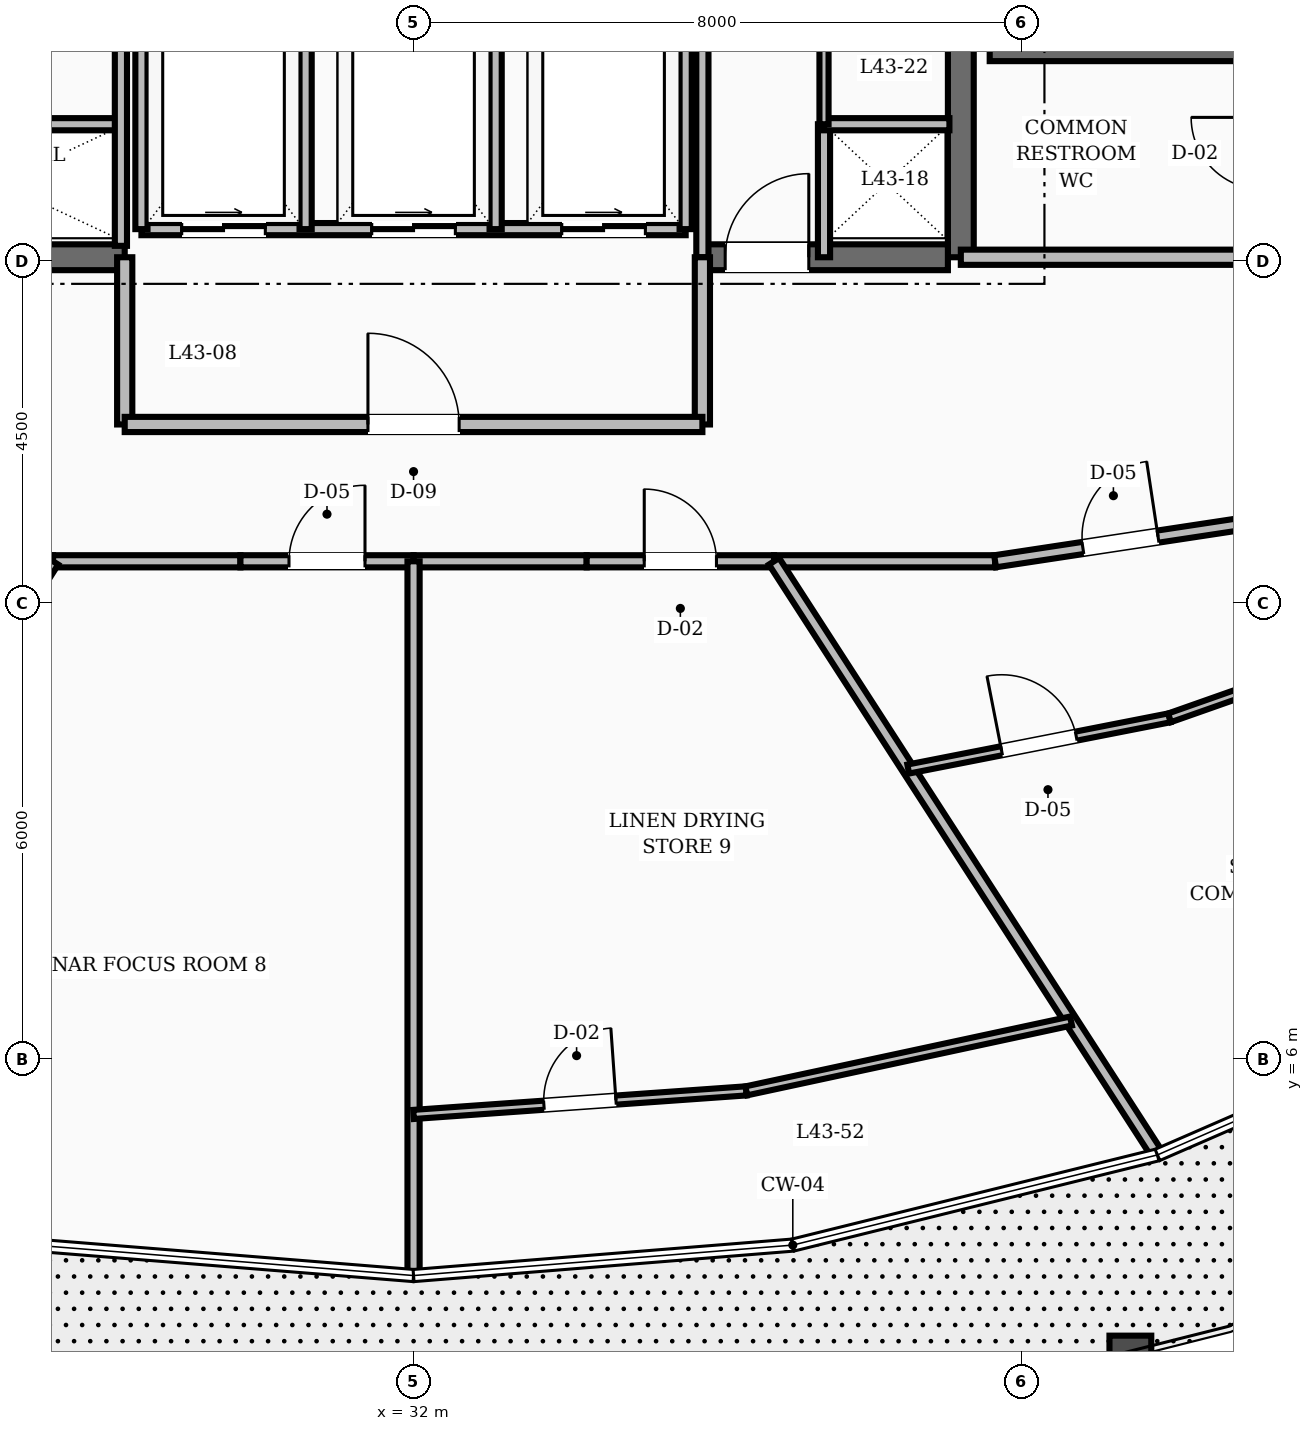
"""IFC4 building model, lengths in metres.
Left out: names, types, materials, properties, quantities, classifications, styles, units other than length and angle.
Written with IfcOpenShell. Run it as: python <this file> out.ifc"""

import sys

from ifc_helpers import new_model, si_unit, direction, frame, frame_2d, origin, place, context, subcontext, project, spatial, rectangle, extrude, element, fill, save


model = new_model("IFC4")
c1 = context("Model", 3, precision=1e-05, world=origin(), true_north=direction((0.0, 1.0)))
c2 = subcontext(c1, "Body", "Model", "MODEL_VIEW")
j1 = project(units=[si_unit("LENGTHUNIT", "METRE"), si_unit("PLANEANGLEUNIT", "RADIAN")], contexts=[c1])
p1 = place(None, origin())
s1 = spatial("IfcSite", under=j1, at=p1, CompositionType="ELEMENT")
p2 = place(p1, origin())
s2 = spatial("IfcBuilding", under=s1, at=p2, CompositionType="ELEMENT")
p3 = place(p2, frame((0.0, 0.0, 167.6)))
s3 = spatial("IfcBuildingStorey", under=s2, at=p3, CompositionType="ELEMENT", Elevation=167.6)
p4 = place(p3, frame((39.2, 16.55, 0.0), z_axis=(0.0, 0.0, 1.0), x_axis=(0.0, 1.0, 0.0)))
e1 = element("IfcWall", 1, at=p4, inside=s3, PredefinedType="SHEAR", context=c2, shape_type="SweptSolid", body=[
    extrude(rectangle(XDim=6.3, YDim=0.34, at=frame_2d((3.15, 0.0))), origin(), (0.0, 0.0, 1.0), 3.6),
])
p5 = place(p3, frame((24.97, 16.55, 0.0), z_axis=(0.0, 0.0, 1.0), x_axis=(1.0, 0.0, 0.0)))
e2 = element("IfcWall", 2, at=p5, inside=s3, PredefinedType="SHEAR", context=c2, shape_type="SweptSolid", body=[
    extrude(rectangle(XDim=3.23, YDim=0.34, at=frame_2d((1.615, 0.0))), origin(), (0.0, 0.0, 1.0), 3.6),
])
p6 = place(p3, frame((35.8, 16.55, 0.0), z_axis=(0.0, 0.0, 1.0), x_axis=(1.0, 0.0, 0.0)))
e3 = element("IfcWall", 3, at=p6, inside=s3, PredefinedType="SHEAR", context=c2, shape_type="SweptSolid", body=[
    extrude(rectangle(XDim=3.23, YDim=0.34, at=frame_2d((1.615, 0.0))), origin(), (0.0, 0.0, 1.0), 3.6),
])
p7 = place(p6, frame((0.3, 0.0, 0.0)))
e4 = element("IfcOpeningElement", 4, at=p7, cuts=e3, PredefinedType="OPENING", context=c2, shape_type="SweptSolid", body=[
    extrude(rectangle(XDim=1.1, YDim=2.1, at=frame_2d((0.55, 1.05))), frame((0.0, 0.18, 0.0), z_axis=(0.0, -1.0, 0.0), x_axis=(1.0, 0.0, 0.0)), (0.0, 0.0, 1.0), 0.36),
])
p8 = place(p3, frame((39.58, 19.28, 0.0), z_axis=(0.0, 0.0, 1.0), x_axis=(1.0, 0.0, 0.0)))
e5 = element("IfcWall", 5, at=p8, inside=s3, PredefinedType="SHEAR", context=c2, shape_type="SweptSolid", body=[
    extrude(rectangle(XDim=3.6, YDim=0.3, at=frame_2d((1.8, 0.0))), origin(), (0.0, 0.0, 1.0), 3.6),
])
p9 = place(p3, frame((39.2, 16.55, 0.0), z_axis=(0.0, 0.0, 1.0), x_axis=(1.0, 0.0, 0.0)))
e6 = element("IfcWall", 6, at=p9, inside=s3, PredefinedType="SOLIDWALL", context=c2, shape_type="SweptSolid", body=[
    extrude(rectangle(XDim=3.98, YDim=0.2, at=frame_2d((1.99, 0.0))), origin(), (0.0, 0.0, 1.0), 2.8),
])
p10 = place(p3, frame((35.8, 16.55, 0.0), z_axis=(0.0, 0.0, 1.0), x_axis=(0.0, 1.0, 0.0)))
e7 = element("IfcWall", 7, at=p10, inside=s3, PredefinedType="SOLIDWALL", context=c2, shape_type="SweptSolid", body=[
    extrude(rectangle(XDim=3.3, YDim=0.16, at=frame_2d((1.65, 0.0))), origin(), (0.0, 0.0, 1.0), 2.8),
])
p11 = place(p3, frame((37.4, 16.55, 0.0), z_axis=(0.0, 0.0, 1.0), x_axis=(0.0, 1.0, 0.0)))
e8 = element("IfcWall", 8, at=p11, inside=s3, PredefinedType="SOLIDWALL", context=c2, shape_type="SweptSolid", body=[
    extrude(rectangle(XDim=1.75, YDim=0.16, at=frame_2d((0.875, 0.0))), origin(), (0.0, 0.0, 1.0), 2.8),
])
for number, where, z_axis, x_axis in (
    (9, (28.2, 14.35, 0.0), (0.0, 0.0, 1.0), (0.0, 1.0, 0.0)),
    (10, (35.8, 14.35, 0.0), (0.0, 0.0, 1.0), (0.0, 1.0, 0.0)),
):
    element("IfcWall", number, at=place(p3, frame(where, z_axis=z_axis, x_axis=x_axis)), inside=s3, PredefinedType="SOLIDWALL", context=c2, shape_type="SweptSolid", body=[
        extrude(rectangle(XDim=2.2, YDim=0.2, at=frame_2d((1.1, 0.0))), origin(), (0.0, 0.0, 1.0), 2.8),
    ])
p12 = place(p3, frame((28.2, 14.35, 0.0), z_axis=(0.0, 0.0, 1.0), x_axis=(1.0, 0.0, 0.0)))
e11 = element("IfcWall", 11, at=p12, inside=s3, PredefinedType="SOLIDWALL", context=c2, shape_type="SweptSolid", body=[
    extrude(rectangle(XDim=7.6, YDim=0.2, at=frame_2d((3.8, 0.0))), origin(), (0.0, 0.0, 1.0), 2.8),
])
p13 = place(p12, frame((3.2, 0.0, 0.0)))
e12 = element("IfcOpeningElement", 12, at=p13, cuts=e11, PredefinedType="OPENING", context=c2, shape_type="SweptSolid", body=[
    extrude(rectangle(XDim=1.2, YDim=2.1, at=frame_2d((0.6, 1.05))), frame((0.0, 0.11, 0.0), z_axis=(0.0, -1.0, 0.0), x_axis=(1.0, 0.0, 0.0)), (0.0, 0.0, 1.0), 0.22),
])
p14 = place(p3, frame((28.42, 16.92, 0.0), z_axis=(0.0, 0.0, 1.0), x_axis=(1.0, 0.0, 0.0)))
e13 = element("IfcWall", 13, at=p14, inside=s3, PredefinedType="SOLIDWALL", context=c2, shape_type="SweptSolid", body=[
    extrude(rectangle(XDim=7.16, YDim=0.16, at=frame_2d((3.58, 0.0))), origin(), (0.0, 0.0, 1.0), 2.8),
])
p15 = place(p14, frame((0.53, 0.0, 0.0)))
e14 = element("IfcOpeningElement", 14, at=p15, cuts=e13, PredefinedType="OPENING", context=c2, shape_type="SweptSolid", body=[
    extrude(rectangle(XDim=1.1, YDim=2.15, at=frame_2d((0.55, 1.075))), frame((0.0, 0.09, 0.0), z_axis=(0.0, -1.0, 0.0), x_axis=(1.0, 0.0, 0.0)), (0.0, 0.0, 1.0), 0.18),
])
p16 = place(p14, frame((3.03, 0.0, 0.0)))
e15 = element("IfcOpeningElement", 15, at=p16, cuts=e13, PredefinedType="OPENING", context=c2, shape_type="SweptSolid", body=[
    extrude(rectangle(XDim=1.1, YDim=2.15, at=frame_2d((0.55, 1.075))), frame((0.0, 0.09, 0.0), z_axis=(0.0, -1.0, 0.0), x_axis=(1.0, 0.0, 0.0)), (0.0, 0.0, 1.0), 0.18),
])
p17 = place(p14, frame((5.53, 0.0, 0.0)))
e16 = element("IfcOpeningElement", 16, at=p17, cuts=e13, PredefinedType="OPENING", context=c2, shape_type="SweptSolid", body=[
    extrude(rectangle(XDim=1.1, YDim=2.15, at=frame_2d((0.55, 1.075))), frame((0.0, 0.09, 0.0), z_axis=(0.0, -1.0, 0.0), x_axis=(1.0, 0.0, 0.0)), (0.0, 0.0, 1.0), 0.18),
])
for number, where, z_axis, x_axis in (
    (17, (28.42, 16.92, 0.0), (0.0, 0.0, 1.0), (0.0, 1.0, 0.0)),
    (18, (30.58, 16.92, 0.0), (0.0, 0.0, 1.0), (0.0, 1.0, 0.0)),
    (19, (33.08, 16.92, 0.0), (0.0, 0.0, 1.0), (0.0, 1.0, 0.0)),
    (20, (35.58, 16.92, 0.0), (0.0, 0.0, 1.0), (0.0, 1.0, 0.0)),
):
    element("IfcWall", number, at=place(p3, frame(where, z_axis=z_axis, x_axis=x_axis)), inside=s3, PredefinedType="SOLIDWALL", context=c2, shape_type="SweptSolid", body=[
        extrude(rectangle(XDim=2.76, YDim=0.16, at=frame_2d((1.38, 0.0))), origin(), (0.0, 0.0, 1.0), 2.8),
    ])
p18 = place(p3, frame((24.95, 18.3, 0.0), z_axis=(0.0, 0.0, 1.0), x_axis=(1.0, 0.0, 0.0)))
e21 = element("IfcWall", 21, at=p18, inside=s3, PredefinedType="SOLIDWALL", context=c2, shape_type="SweptSolid", body=[
    extrude(rectangle(XDim=3.2, YDim=0.16, at=frame_2d((1.6, 0.0))), origin(), (0.0, 0.0, 1.0), 2.8),
])
p19 = place(p3, frame((28.15, 16.7, 0.0), z_axis=(0.0, 0.0, 1.0), x_axis=(0.0, 1.0, 0.0)))
e22 = element("IfcWall", 22, at=p19, inside=s3, PredefinedType="SOLIDWALL", context=c2, shape_type="SweptSolid", body=[
    extrude(rectangle(XDim=6.05, YDim=0.16, at=frame_2d((3.025, 0.0))), origin(), (0.0, 0.0, 1.0), 2.8),
])
p20 = place(p3, frame((37.4, 18.3, 0.0), z_axis=(0.0, 0.0, 1.0), x_axis=(1.0, 0.0, 0.0)))
e23 = element("IfcWall", 23, at=p20, inside=s3, PredefinedType="SOLIDWALL", context=c2, shape_type="SweptSolid", body=[
    extrude(rectangle(XDim=1.65, YDim=0.16, at=frame_2d((0.825, 0.0))), origin(), (0.0, 0.0, 1.0), 2.8),
])
p21 = place(p3, frame((37.4, 18.3, 0.0), z_axis=(0.0, 0.0, 1.0), x_axis=(0.0, 1.0, 0.0)))
e24 = element("IfcWall", 24, at=p21, inside=s3, PredefinedType="PARTITIONING", context=c2, shape_type="SweptSolid", body=[
    extrude(rectangle(XDim=4.45, YDim=0.12, at=frame_2d((2.225, 0.0))), origin(), (0.0, 0.0, 1.0), 2.8),
])
p22 = place(p21, frame((1.75, 0.0, 0.0)))
e25 = element("IfcOpeningElement", 25, at=p22, cuts=e24, PredefinedType="OPENING", context=c2, shape_type="SweptSolid", body=[
    extrude(rectangle(XDim=0.95, YDim=2.1, at=frame_2d((0.475, 1.05))), frame((0.0, 0.07, 0.0), z_axis=(0.0, -1.0, 0.0), x_axis=(1.0, 0.0, 0.0)), (0.0, 0.0, 1.0), 0.14),
])
p23 = place(p3, frame((24.349, 12.55, 0.0), z_axis=(0.0, 0.0, 1.0), x_axis=(1.0, 0.0, 0.0)))
e26 = element("IfcWall", 26, at=p23, inside=s3, PredefinedType="SOLIDWALL", context=c2, shape_type="SweptSolid", body=[
    extrude(rectangle(XDim=2.908, YDim=0.16, at=frame_2d((1.454, 0.0))), origin(), (0.0, 0.0, 1.0), 2.8),
])
p24 = place(p3, frame((27.257, 12.55, 0.0), z_axis=(0.0, 0.0, 1.0), x_axis=(1.0, 0.0, 0.0)))
e27 = element("IfcWall", 27, at=p24, inside=s3, PredefinedType="SOLIDWALL", context=c2, shape_type="SweptSolid", body=[
    extrude(rectangle(XDim=2.465, YDim=0.16, at=frame_2d((1.232, 0.0))), origin(), (0.0, 0.0, 1.0), 2.8),
])
p25 = place(p3, frame((29.722, 12.55, 0.0), z_axis=(0.0, 0.0, 1.0), x_axis=(1.0, 0.0, 0.0)))
e28 = element("IfcWall", 28, at=p25, inside=s3, PredefinedType="SOLIDWALL", context=c2, shape_type="SweptSolid", body=[
    extrude(rectangle(XDim=2.278, YDim=0.16, at=frame_2d((1.139, 0.0))), origin(), (0.0, 0.0, 1.0), 2.8),
])
p26 = place(p25, frame((0.639, 0.0, 0.0)))
e29 = element("IfcOpeningElement", 29, at=p26, cuts=e28, PredefinedType="OPENING", context=c2, shape_type="SweptSolid", body=[
    extrude(rectangle(XDim=1.0, YDim=2.1, at=frame_2d((0.5, 1.05))), frame((0.0, 0.09, 0.0), z_axis=(0.0, -1.0, 0.0), x_axis=(1.0, 0.0, 0.0)), (0.0, 0.0, 1.0), 0.18),
])
p27 = place(p3, frame((32.0, 12.55, 0.0), z_axis=(0.0, 0.0, 1.0), x_axis=(1.0, 0.0, 0.0)))
e30 = element("IfcWall", 30, at=p27, inside=s3, PredefinedType="SOLIDWALL", context=c2, shape_type="SweptSolid", body=[
    extrude(rectangle(XDim=2.278, YDim=0.16, at=frame_2d((1.139, 0.0))), origin(), (0.0, 0.0, 1.0), 2.8),
])
p28 = place(p3, frame((34.278, 12.55, 0.0), z_axis=(0.0, 0.0, 1.0), x_axis=(1.0, 0.0, 0.0)))
e31 = element("IfcWall", 31, at=p28, inside=s3, PredefinedType="SOLIDWALL", context=c2, shape_type="SweptSolid", body=[
    extrude(rectangle(XDim=2.465, YDim=0.16, at=frame_2d((1.232, 0.0))), origin(), (0.0, 0.0, 1.0), 2.8),
])
p29 = place(p28, frame((0.758, 0.0, 0.0)))
e32 = element("IfcOpeningElement", 32, at=p29, cuts=e31, PredefinedType="OPENING", context=c2, shape_type="SweptSolid", body=[
    extrude(rectangle(XDim=0.95, YDim=2.1, at=frame_2d((0.475, 1.05))), frame((0.0, 0.09, 0.0), z_axis=(0.0, -1.0, 0.0), x_axis=(1.0, 0.0, 0.0)), (0.0, 0.0, 1.0), 0.18),
])
p30 = place(p3, frame((36.743, 12.55, 0.0), z_axis=(0.0, 0.0, 1.0), x_axis=(1.0, 0.0, 0.0)))
e33 = element("IfcWall", 33, at=p30, inside=s3, PredefinedType="SOLIDWALL", context=c2, shape_type="SweptSolid", body=[
    extrude(rectangle(XDim=2.908, YDim=0.16, at=frame_2d((1.454, 0.0))), origin(), (0.0, 0.0, 1.0), 2.8),
])
p31 = place(p3, frame((39.651, 12.55, 0.0), z_axis=(0.0, 0.0, 1.0), x_axis=(0.988710906508, 0.149835721217, 0.0)))
e34 = element("IfcWall", 34, at=p31, inside=s3, PredefinedType="SOLIDWALL", context=c2, shape_type="SweptSolid", body=[
    extrude(rectangle(XDim=3.337, YDim=0.16, at=frame_2d((1.668, 0.0))), origin(), (0.0, 0.0, 1.0), 2.8),
])
p32 = place(p31, frame((1.168, 0.0, 0.0)))
e35 = element("IfcOpeningElement", 35, at=p32, cuts=e34, PredefinedType="OPENING", context=c2, shape_type="SweptSolid", body=[
    extrude(rectangle(XDim=1.0, YDim=2.1, at=frame_2d((0.5, 1.05))), frame((0.0, 0.09, 0.0), z_axis=(0.0, -1.0, 0.0), x_axis=(1.0, 0.0, 0.0)), (0.0, 0.0, 1.0), 0.18),
])
p33 = place(p3, frame((36.743, 12.55, 0.0), z_axis=(0.0, 0.0, 1.0), x_axis=(0.542572394961, -0.840009045324, 0.0)))
e36 = element("IfcWall", 36, at=p33, inside=s3, PredefinedType="SOLIDWALL", context=c2, shape_type="SweptSolid", body=[
    extrude(rectangle(XDim=9.247, YDim=0.16, at=frame_2d((4.624, 0.0))), origin(), (0.0, 0.0, 1.0), 2.8),
])
p34 = place(p3, frame((38.508, 9.817, 0.0), z_axis=(0.0, 0.0, 1.0), x_axis=(0.981313491658, 0.192415776612, 0.0)))
e37 = element("IfcWall", 37, at=p34, inside=s3, PredefinedType="PARTITIONING", context=c2, shape_type="SweptSolid", body=[
    extrude(rectangle(XDim=3.503, YDim=0.12, at=frame_2d((1.751, 0.0))), origin(), (0.0, 0.0, 1.0), 2.8),
])
p35 = place(p34, frame((1.252, 0.0, 0.0)))
e38 = element("IfcOpeningElement", 38, at=p35, cuts=e37, PredefinedType="OPENING", context=c2, shape_type="SweptSolid", body=[
    extrude(rectangle(XDim=1.0, YDim=2.1, at=frame_2d((0.5, 1.05))), frame((0.0, 0.07, 0.0), z_axis=(0.0, -1.0, 0.0), x_axis=(1.0, 0.0, 0.0)), (0.0, 0.0, 1.0), 0.14),
])
p36 = place(p3, frame((41.946, 10.491, 0.0), z_axis=(0.0, 0.0, 1.0), x_axis=(0.943262037543, 0.332049286298, 0.0)))
e39 = element("IfcWall", 39, at=p36, inside=s3, PredefinedType="PARTITIONING", context=c2, shape_type="SweptSolid", body=[
    extrude(rectangle(XDim=3.712, YDim=0.12, at=frame_2d((1.856, 0.0))), origin(), (0.0, 0.0, 1.0), 2.8),
])
p37 = place(p3, frame((27.257, 12.55, 0.0), z_axis=(0.0, 0.0, 1.0), x_axis=(-0.53396393122, -0.845507256122, 0.0)))
e40 = element("IfcWall", 40, at=p37, inside=s3, PredefinedType="SOLIDWALL", context=c2, shape_type="SweptSolid", body=[
    extrude(rectangle(XDim=9.799, YDim=0.16, at=frame_2d((4.899, 0.0))), origin(), (0.0, 0.0, 1.0), 2.8),
])
p38 = place(p3, frame((32.0, 12.55, 0.0), z_axis=(0.0, 0.0, 1.0), x_axis=(0.0, -1.0, 0.0)))
e41 = element("IfcWall", 41, at=p38, inside=s3, PredefinedType="SOLIDWALL", context=c2, shape_type="SweptSolid", body=[
    extrude(rectangle(XDim=9.347, YDim=0.16, at=frame_2d((4.673, 0.0))), origin(), (0.0, 0.0, 1.0), 2.8),
])
p39 = place(p3, frame((32.0, 5.273, 0.0), z_axis=(0.0, 0.0, 1.0), x_axis=(0.997497239471, 0.070705425875, 0.0)))
e42 = element("IfcWall", 42, at=p39, inside=s3, PredefinedType="PARTITIONING", context=c2, shape_type="SweptSolid", body=[
    extrude(rectangle(XDim=4.389, YDim=0.12, at=frame_2d((2.194, 0.0))), origin(), (0.0, 0.0, 1.0), 2.8),
])
p40 = place(p39, frame((1.719, 0.0, 0.0)))
e43 = element("IfcOpeningElement", 43, at=p40, cuts=e42, PredefinedType="OPENING", context=c2, shape_type="SweptSolid", body=[
    extrude(rectangle(XDim=0.95, YDim=2.1, at=frame_2d((0.475, 1.05))), frame((0.0, 0.07, 0.0), z_axis=(0.0, -1.0, 0.0), x_axis=(1.0, 0.0, 0.0)), (0.0, 0.0, 1.0), 0.14),
])
p41 = place(p3, frame((36.378, 5.583, 0.0), z_axis=(0.0, 0.0, 1.0), x_axis=(0.977645964839, 0.210257859387, 0.0)))
e44 = element("IfcWall", 44, at=p41, inside=s3, PredefinedType="PARTITIONING", context=c2, shape_type="SweptSolid", body=[
    extrude(rectangle(XDim=4.369, YDim=0.12, at=frame_2d((2.185, 0.0))), origin(), (0.0, 0.0, 1.0), 2.8),
])
p42 = place(p7, origin())
e45 = element("IfcDoor", 45, at=p42, inside=s3, OperationType="SINGLE_SWING_RIGHT", PredefinedType="DOOR", context=c2, shape_type="SweptSolid", body=[
    extrude(rectangle(XDim=1.1, YDim=2.1, at=frame_2d((0.55, 1.05))), frame((0.0, 0.025, 0.0), z_axis=(0.0, -1.0, 0.0), x_axis=(1.0, 0.0, 0.0)), (0.0, 0.0, 1.0), 0.05),
])
fill(e4, e45)
p43 = place(p13, origin())
e46 = element("IfcDoor", 46, at=p43, inside=s3, OperationType="SINGLE_SWING_LEFT", PredefinedType="DOOR", context=c2, shape_type="SweptSolid", body=[
    extrude(rectangle(XDim=1.2, YDim=2.1, at=frame_2d((0.6, 1.05))), frame((0.0, 0.025, 0.0), z_axis=(0.0, -1.0, 0.0), x_axis=(1.0, 0.0, 0.0)), (0.0, 0.0, 1.0), 0.05),
])
fill(e12, e46)
p44 = place(p15, origin())
e47 = element("IfcDoor", 47, at=p44, inside=s3, OperationType="SLIDING_TO_RIGHT", PredefinedType="DOOR", context=c2, shape_type="SweptSolid", body=[
    extrude(rectangle(XDim=1.1, YDim=2.15, at=frame_2d((0.55, 1.075))), frame((0.0, 0.025, 0.0), z_axis=(0.0, -1.0, 0.0), x_axis=(1.0, 0.0, 0.0)), (0.0, 0.0, 1.0), 0.05),
])
fill(e14, e47)
p45 = place(p16, origin())
e48 = element("IfcDoor", 48, at=p45, inside=s3, OperationType="SLIDING_TO_RIGHT", PredefinedType="DOOR", context=c2, shape_type="SweptSolid", body=[
    extrude(rectangle(XDim=1.1, YDim=2.15, at=frame_2d((0.55, 1.075))), frame((0.0, 0.025, 0.0), z_axis=(0.0, -1.0, 0.0), x_axis=(1.0, 0.0, 0.0)), (0.0, 0.0, 1.0), 0.05),
])
fill(e15, e48)
p46 = place(p17, origin())
e49 = element("IfcDoor", 49, at=p46, inside=s3, OperationType="SLIDING_TO_RIGHT", PredefinedType="DOOR", context=c2, shape_type="SweptSolid", body=[
    extrude(rectangle(XDim=1.1, YDim=2.15, at=frame_2d((0.55, 1.075))), frame((0.0, 0.025, 0.0), z_axis=(0.0, -1.0, 0.0), x_axis=(1.0, 0.0, 0.0)), (0.0, 0.0, 1.0), 0.05),
])
fill(e16, e49)
p47 = place(p32, origin())
e50 = element("IfcDoor", 50, at=p47, inside=s3, OperationType="SINGLE_SWING_RIGHT", PredefinedType="DOOR", context=c2, shape_type="SweptSolid", body=[
    extrude(rectangle(XDim=1.0, YDim=2.1, at=frame_2d((0.5, 1.05))), frame((0.0, 0.025, 0.0), z_axis=(0.0, -1.0, 0.0), x_axis=(1.0, 0.0, 0.0)), (0.0, 0.0, 1.0), 0.05),
])
fill(e35, e50)
p48 = place(p35, origin())
e51 = element("IfcDoor", 51, at=p48, inside=s3, OperationType="SINGLE_SWING_LEFT", PredefinedType="DOOR", context=c2, shape_type="SweptSolid", body=[
    extrude(rectangle(XDim=1.0, YDim=2.1, at=frame_2d((0.5, 1.05))), frame((0.0, 0.025, 0.0), z_axis=(0.0, -1.0, 0.0), x_axis=(1.0, 0.0, 0.0)), (0.0, 0.0, 1.0), 0.05),
])
fill(e38, e51)
p49 = place(p26, origin())
e52 = element("IfcDoor", 52, at=p49, inside=s3, OperationType="SINGLE_SWING_RIGHT", PredefinedType="DOOR", context=c2, shape_type="SweptSolid", body=[
    extrude(rectangle(XDim=1.0, YDim=2.1, at=frame_2d((0.5, 1.05))), frame((0.0, 0.025, 0.0), z_axis=(0.0, -1.0, 0.0), x_axis=(1.0, 0.0, 0.0)), (0.0, 0.0, 1.0), 0.05),
])
fill(e29, e52)
p50 = place(p29, origin())
e53 = element("IfcDoor", 53, at=p50, inside=s3, OperationType="SINGLE_SWING_LEFT", PredefinedType="DOOR", context=c2, shape_type="SweptSolid", body=[
    extrude(rectangle(XDim=0.95, YDim=2.1, at=frame_2d((0.475, 1.05))), frame((0.0, 0.025, 0.0), z_axis=(0.0, -1.0, 0.0), x_axis=(1.0, 0.0, 0.0)), (0.0, 0.0, 1.0), 0.05),
])
fill(e32, e53)
p51 = place(p40, origin())
e54 = element("IfcDoor", 54, at=p51, inside=s3, OperationType="SINGLE_SWING_RIGHT", PredefinedType="DOOR", context=c2, shape_type="SweptSolid", body=[
    extrude(rectangle(XDim=0.95, YDim=2.1, at=frame_2d((0.475, 1.05))), frame((0.0, 0.025, 0.0), z_axis=(0.0, -1.0, 0.0), x_axis=(1.0, 0.0, 0.0)), (0.0, 0.0, 1.0), 0.05),
])
fill(e43, e54)
save(model, sys.argv[1])
